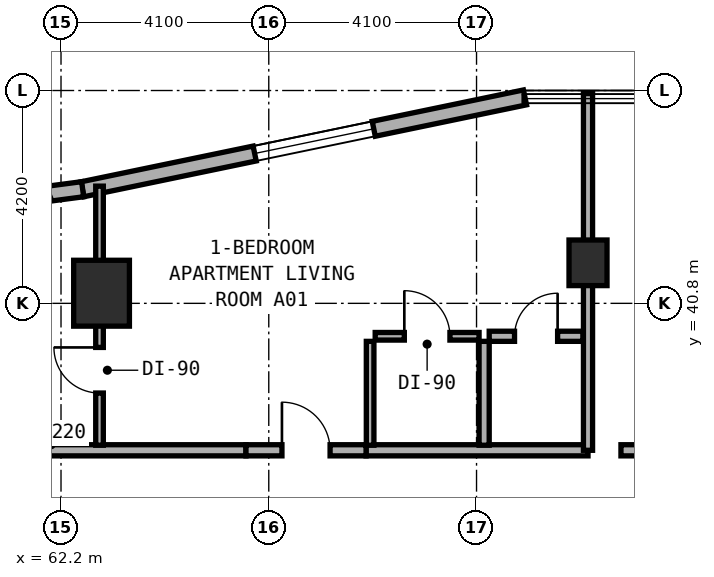
"""IFC4 building model, lengths in metres.
Left out: names, types, materials, properties, quantities, classifications, styles, units other than length and angle.
Written with IfcOpenShell. Run it as: python <this file> out.ifc"""

import sys

from ifc_helpers import new_model, si_unit, direction, frame, frame_2d, origin, origin_2d, place, context, subcontext, project, spatial, rectangle, extrude, element, fill, save


model = new_model("IFC4")
c1 = context("Model", 3, precision=1e-05, world=origin(), true_north=direction((0.0, 1.0)))
c2 = subcontext(c1, "Body", "Model", "MODEL_VIEW")
j1 = project(units=[si_unit("LENGTHUNIT", "METRE"), si_unit("PLANEANGLEUNIT", "RADIAN")], contexts=[c1])
p1 = place(None, origin())
s1 = spatial("IfcSite", under=j1, at=p1, CompositionType="ELEMENT")
p2 = place(p1, origin())
s2 = spatial("IfcBuilding", under=s1, at=p2, CompositionType="ELEMENT")
p3 = place(p2, frame((0.0, 0.0, 38.0)))
s3 = spatial("IfcBuildingStorey", under=s2, at=p3, CompositionType="ELEMENT", Elevation=38.0)
p4 = place(p3, frame((72.6, 41.6, 0.0), z_axis=(0.0, 0.0, 1.0), x_axis=(1.0, 0.0, 0.0)))
e1 = element("IfcColumn", 1, at=p4, inside=s3, PredefinedType="COLUMN", context=c2, shape_type="SweptSolid", body=[
    extrude(rectangle(XDim=0.75, YDim=0.9, at=origin_2d()), origin(), (0.0, 0.0, 1.0), 3.5),
])
p5 = place(p3, frame((63.0, 41.0, 0.0), z_axis=(0.0, 0.0, 1.0), x_axis=(1.0, 0.0, 0.0)))
e2 = element("IfcColumn", 2, at=p5, inside=s3, PredefinedType="COLUMN", context=c2, shape_type="SweptSolid", body=[
    extrude(rectangle(XDim=1.1, YDim=1.3, at=origin_2d()), origin(), (0.0, 0.0, 1.0), 3.5),
])
p6 = place(p3, frame((71.356, 44.864, 0.0), z_axis=(0.0, 0.0, 1.0), x_axis=(-0.979127260729, -0.203248142175, 0.0)))
e3 = element("IfcWall", 3, at=p6, inside=s3, PredefinedType="STANDARD", context=c2, shape_type="SweptSolid", body=[
    extrude(rectangle(XDim=8.92, YDim=0.3, at=frame_2d((4.46, 0.0))), origin(), (0.0, 0.0, 1.0), 3.25),
])
p7 = place(p6, frame((3.048, 0.0, 0.8)))
e4 = element("IfcOpeningElement", 4, at=p7, cuts=e3, PredefinedType="OPENING", context=c2, shape_type="SweptSolid", body=[
    extrude(rectangle(XDim=2.4, YDim=1.6, at=frame_2d((1.2, 0.8))), frame((0.0, 0.16, 0.0), z_axis=(0.0, -1.0, 0.0), x_axis=(1.0, 0.0, 0.0)), (0.0, 0.0, 1.0), 0.32),
])
p8 = place(p3, frame((62.627, 43.052, 0.0), z_axis=(0.0, 0.0, 1.0), x_axis=(-0.991480488834, -0.130255288807, 0.0)))
e5 = element("IfcWall", 5, at=p8, inside=s3, PredefinedType="STANDARD", context=c2, shape_type="SweptSolid", body=[
    extrude(rectangle(XDim=0.729, YDim=0.3, at=frame_2d((0.365, 0.0))), origin(), (0.0, 0.0, 1.0), 3.25),
])
p9 = place(p3, frame((58.16, 37.9, 0.0), z_axis=(0.0, 0.0, 1.0), x_axis=(1.0, 0.0, 0.0)))
e6 = element("IfcWall", 6, at=p9, inside=s3, PredefinedType="SOLIDWALL", context=c2, shape_type="SweptSolid", body=[
    extrude(rectangle(XDim=7.69, YDim=0.22, at=frame_2d((3.845, 0.0))), origin(), (0.0, 0.0, 1.0), 2.865),
])
p10 = place(p3, frame((68.22, 37.9, 0.0), z_axis=(0.0, 0.0, 1.0), x_axis=(1.0, 0.0, 0.0)))
e7 = element("IfcWall", 7, at=p10, inside=s3, PredefinedType="SOLIDWALL", context=c2, shape_type="SweptSolid", body=[
    extrude(rectangle(XDim=4.38, YDim=0.22, at=frame_2d((2.19, 0.0))), origin(), (0.0, 0.0, 1.0), 2.725),
])
p11 = place(p3, frame((65.85, 37.9, 0.0), z_axis=(0.0, 0.0, 1.0), x_axis=(1.0, 0.0, 0.0)))
e8 = element("IfcWall", 8, at=p11, inside=s3, PredefinedType="SOLIDWALL", context=c2, shape_type="SweptSolid", body=[
    extrude(rectangle(XDim=2.37, YDim=0.22, at=frame_2d((1.185, 0.0))), origin(), (0.0, 0.0, 1.0), 3.22),
])
p12 = place(p11, frame((0.71, 0.0, 0.0)))
e9 = element("IfcOpeningElement", 9, at=p12, cuts=e8, PredefinedType="OPENING", context=c2, shape_type="SweptSolid", body=[
    extrude(rectangle(XDim=0.95, YDim=2.1, at=frame_2d((0.475, 1.05))), frame((0.0, 0.12, 0.0), z_axis=(0.0, -1.0, 0.0), x_axis=(1.0, 0.0, 0.0)), (0.0, 0.0, 1.0), 0.24),
])
p13 = place(p3, frame((62.96, 38.0, 0.0), z_axis=(0.0, 0.0, 1.0), x_axis=(0.0, 1.0, 0.0)))
e10 = element("IfcWall", 10, at=p13, inside=s3, PredefinedType="PARTITIONING", context=c2, shape_type="SweptSolid", body=[
    extrude(rectangle(XDim=5.113, YDim=0.15, at=frame_2d((2.557, 0.0))), origin(), (0.0, 0.0, 1.0), 2.865),
])
p14 = place(p13, frame((1.03, 0.0, 0.0)))
e11 = element("IfcOpeningElement", 11, at=p14, cuts=e10, PredefinedType="OPENING", context=c2, shape_type="SweptSolid", body=[
    extrude(rectangle(XDim=0.9, YDim=2.1, at=frame_2d((0.45, 1.05))), frame((0.0, 0.085, 0.0), z_axis=(0.0, -1.0, 0.0), x_axis=(1.0, 0.0, 0.0)), (0.0, 0.0, 1.0), 0.17),
])
p15 = place(p3, frame((70.55, 38.0, 0.0), z_axis=(0.0, 0.0, 1.0), x_axis=(0.0, 1.0, 0.0)))
e12 = element("IfcWall", 12, at=p15, inside=s3, PredefinedType="PLUMBINGWALL", context=c2, shape_type="SweptSolid", body=[
    extrude(rectangle(XDim=2.05, YDim=0.2, at=frame_2d((1.025, 0.0))), origin(), (0.0, 0.0, 1.0), 3.22),
])
p16 = place(p3, frame((68.3, 38.0, 0.0), z_axis=(0.0, 0.0, 1.0), x_axis=(0.0, 1.0, 0.0)))
e13 = element("IfcWall", 13, at=p16, inside=s3, PredefinedType="PARTITIONING", context=c2, shape_type="SweptSolid", body=[
    extrude(rectangle(XDim=2.05, YDim=0.15, at=frame_2d((1.025, 0.0))), origin(), (0.0, 0.0, 1.0), 3.22),
])
p17 = place(p3, frame((70.65, 40.15, 0.0), z_axis=(0.0, 0.0, 1.0), x_axis=(1.0, 0.0, 0.0)))
e14 = element("IfcWall", 14, at=p17, inside=s3, PredefinedType="PLUMBINGWALL", context=c2, shape_type="SweptSolid", body=[
    extrude(rectangle(XDim=1.85, YDim=0.2, at=frame_2d((0.925, 0.0))), origin(), (0.0, 0.0, 1.0), 3.22),
])
p18 = place(p17, frame((0.5, 0.0, 0.0)))
e15 = element("IfcOpeningElement", 15, at=p18, cuts=e14, PredefinedType="OPENING", context=c2, shape_type="SweptSolid", body=[
    extrude(rectangle(XDim=0.85, YDim=2.1, at=frame_2d((0.425, 1.05))), frame((0.0, 0.11, 0.0), z_axis=(0.0, -1.0, 0.0), x_axis=(1.0, 0.0, 0.0)), (0.0, 0.0, 1.0), 0.22),
])
p19 = place(p3, frame((68.4, 40.15, 0.0), z_axis=(0.0, 0.0, 1.0), x_axis=(1.0, 0.0, 0.0)))
e16 = element("IfcWall", 16, at=p19, inside=s3, PredefinedType="PARTITIONING", context=c2, shape_type="SweptSolid", body=[
    extrude(rectangle(XDim=2.05, YDim=0.15, at=frame_2d((1.025, 0.0))), origin(), (0.0, 0.0, 1.0), 3.22),
])
p20 = place(p19, frame((0.575, 0.0, 0.0)))
e17 = element("IfcOpeningElement", 17, at=p20, cuts=e16, PredefinedType="OPENING", context=c2, shape_type="SweptSolid", body=[
    extrude(rectangle(XDim=0.9, YDim=2.1, at=frame_2d((0.45, 1.05))), frame((0.0, 0.085, 0.0), z_axis=(0.0, -1.0, 0.0), x_axis=(1.0, 0.0, 0.0)), (0.0, 0.0, 1.0), 0.17),
])
p21 = place(p3, frame((72.6, 37.9, 0.0), z_axis=(0.0, 0.0, 1.0), x_axis=(0.0, 1.0, 0.0)))
e18 = element("IfcWall", 18, at=p21, inside=s3, PredefinedType="SOLIDWALL", context=c2, shape_type="SweptSolid", body=[
    extrude(rectangle(XDim=7.04, YDim=0.18, at=frame_2d((3.52, 0.0))), origin(), (0.0, 0.0, 1.0), 2.725),
])
p22 = place(p3, frame((73.25, 37.9, 0.0), z_axis=(0.0, 0.0, 1.0), x_axis=(1.0, 0.0, 0.0)))
e19 = element("IfcWall", 19, at=p22, inside=s3, PredefinedType="SOLIDWALL", context=c2, shape_type="SweptSolid", body=[
    extrude(rectangle(XDim=3.3, YDim=0.22, at=frame_2d((1.65, 0.0))), origin(), (0.0, 0.0, 1.0), 3.22),
])
p23 = place(p22, frame((0.98, 0.0, 0.0)))
e20 = element("IfcOpeningElement", 20, at=p23, cuts=e19, PredefinedType="OPENING", context=c2, shape_type="SweptSolid", body=[
    extrude(rectangle(XDim=1.1, YDim=2.1, at=frame_2d((0.55, 1.05))), frame((0.0, 0.12, 0.0), z_axis=(0.0, -1.0, 0.0), x_axis=(1.0, 0.0, 0.0)), (0.0, 0.0, 1.0), 0.24),
])
p24 = place(p7, origin())
e21 = element("IfcWindow", 21, at=p24, inside=s3, PartitioningType="SINGLE_PANEL", PredefinedType="WINDOW", context=c2, shape_type="SweptSolid", body=[
    extrude(rectangle(XDim=2.4, YDim=1.6, at=frame_2d((1.2, 0.8))), frame((0.0, 0.03, 0.0), z_axis=(0.0, -1.0, 0.0), x_axis=(1.0, 0.0, 0.0)), (0.0, 0.0, 1.0), 0.06),
])
fill(e4, e21)
p25 = place(p12, origin())
e22 = element("IfcDoor", 22, at=p25, inside=s3, OperationType="SINGLE_SWING_LEFT", PredefinedType="DOOR", context=c2, shape_type="SweptSolid", body=[
    extrude(rectangle(XDim=0.95, YDim=2.1, at=frame_2d((0.475, 1.05))), frame((0.0, 0.025, 0.0), z_axis=(0.0, -1.0, 0.0), x_axis=(1.0, 0.0, 0.0)), (0.0, 0.0, 1.0), 0.05),
])
fill(e9, e22)
p26 = place(p14, origin())
e23 = element("IfcDoor", 23, at=p26, inside=s3, OperationType="SINGLE_SWING_RIGHT", PredefinedType="DOOR", context=c2, shape_type="SweptSolid", body=[
    extrude(rectangle(XDim=0.9, YDim=2.1, at=frame_2d((0.45, 1.05))), frame((0.0, 0.025, 0.0), z_axis=(0.0, -1.0, 0.0), x_axis=(1.0, 0.0, 0.0)), (0.0, 0.0, 1.0), 0.05),
])
fill(e11, e23)
p27 = place(p18, origin())
e24 = element("IfcDoor", 24, at=p27, inside=s3, OperationType="SINGLE_SWING_RIGHT", PredefinedType="DOOR", context=c2, shape_type="SweptSolid", body=[
    extrude(rectangle(XDim=0.85, YDim=2.1, at=frame_2d((0.425, 1.05))), frame((0.0, 0.025, 0.0), z_axis=(0.0, -1.0, 0.0), x_axis=(1.0, 0.0, 0.0)), (0.0, 0.0, 1.0), 0.05),
])
fill(e15, e24)
p28 = place(p20, origin())
e25 = element("IfcDoor", 25, at=p28, inside=s3, OperationType="SINGLE_SWING_LEFT", PredefinedType="DOOR", context=c2, shape_type="SweptSolid", body=[
    extrude(rectangle(XDim=0.9, YDim=2.1, at=frame_2d((0.45, 1.05))), frame((0.0, 0.025, 0.0), z_axis=(0.0, -1.0, 0.0), x_axis=(1.0, 0.0, 0.0)), (0.0, 0.0, 1.0), 0.05),
])
fill(e17, e25)
save(model, sys.argv[1])
